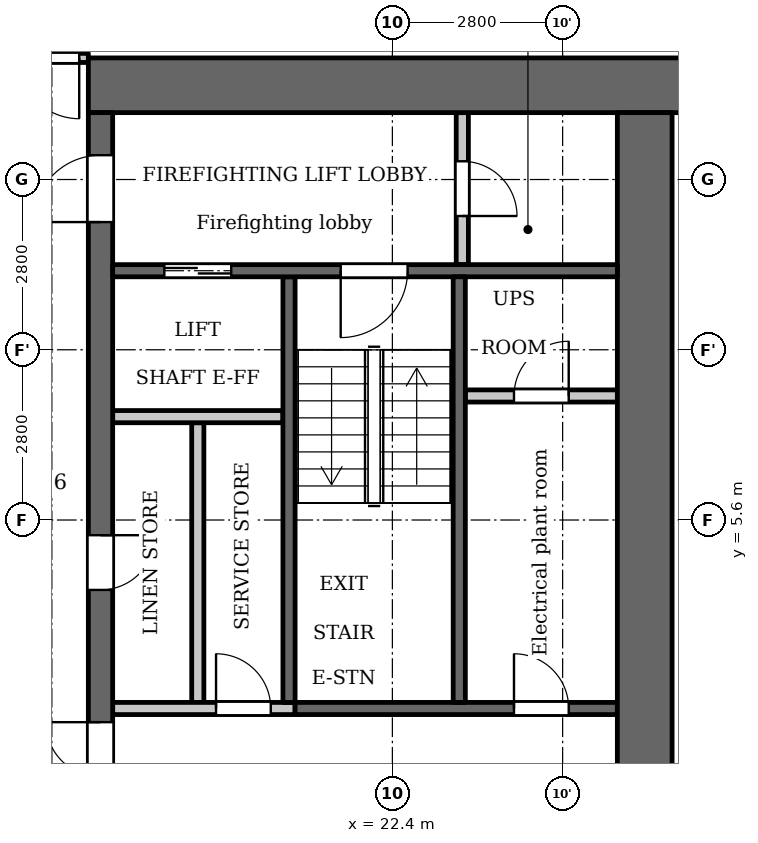
"""IFC4 building model, lengths in metres.
Left out: names, types, materials, properties, quantities, classifications, styles, units other than length and angle.
Written with IfcOpenShell. Run it as: python <this file> out.ifc"""

import sys

from ifc_helpers import new_model, si_unit, direction, frame, frame_2d, origin, place, context, subcontext, project, spatial, rectangle, extrude, element, fill, save


model = new_model("IFC4")
c1 = context("Model", 3, precision=1e-05, world=origin(), true_north=direction((0.0, 1.0)))
c2 = subcontext(c1, "Body", "Model", "MODEL_VIEW")
j1 = project(units=[si_unit("LENGTHUNIT", "METRE"), si_unit("PLANEANGLEUNIT", "RADIAN")], contexts=[c1])
p1 = place(None, origin())
s1 = spatial("IfcSite", under=j1, at=p1, CompositionType="ELEMENT")
p2 = place(p1, origin())
s2 = spatial("IfcBuilding", under=s1, at=p2, CompositionType="ELEMENT")
p3 = place(p2, frame((0.0, 0.0, 104.3)))
s3 = spatial("IfcBuildingStorey", under=s2, at=p3, CompositionType="ELEMENT", Elevation=104.3)
p4 = place(p3, frame((20.7, 2.6, 0.0), z_axis=(0.0, 0.0, 1.0), x_axis=(0.0, 1.0, 0.0)))
e1 = element("IfcWall", 1, at=p4, inside=s3, PredefinedType="SHEAR", context=c2, shape_type="SweptSolid", body=[
    extrude(rectangle(XDim=7.0, YDim=0.2, at=frame_2d((3.5, 0.0))), origin(), (0.0, 0.0, 1.0), 3.2),
])
p5 = place(p3, frame((20.8, 2.5, 0.0), z_axis=(0.0, 0.0, 1.0), x_axis=(1.0, 0.0, 0.0)))
e2 = element("IfcWall", 2, at=p5, inside=s3, PredefinedType="SHEAR", context=c2, shape_type="SweptSolid", body=[
    extrude(rectangle(XDim=5.3, YDim=0.2, at=frame_2d((2.65, 0.0))), origin(), (0.0, 0.0, 1.0), 3.2),
])
p6 = place(p5, frame((3.6, 0.0, 0.0)))
e3 = element("IfcOpeningElement", 3, at=p6, cuts=e2, PredefinedType="OPENING", context=c2, shape_type="SweptSolid", body=[
    extrude(rectangle(XDim=0.9, YDim=2.1, at=frame_2d((0.45, 1.05))), frame((0.0, 0.11, 0.0), z_axis=(0.0, -1.0, 0.0), x_axis=(1.0, 0.0, 0.0)), (0.0, 0.0, 1.0), 0.22),
])
p7 = place(p3, frame((17.4, 12.75, 0.0), z_axis=(0.0, 0.0, 1.0), x_axis=(1.0, 0.0, 0.0)))
e4 = element("IfcWall", 4, at=p7, inside=s3, PredefinedType="SHEAR", context=c2, shape_type="SweptSolid", body=[
    extrude(rectangle(XDim=10.4, YDim=0.9, at=frame_2d((5.2, 0.0))), origin(), (0.0, 0.0, 1.0), 3.2),
])
p8 = place(p3, frame((19.2, 2.6, 0.0), z_axis=(0.0, 0.0, 1.0), x_axis=(0.0, 1.0, 0.0)))
e5 = element("IfcWall", 5, at=p8, inside=s3, PredefinedType="PARTITIONING", context=c2, shape_type="SweptSolid", body=[
    extrude(rectangle(XDim=4.6, YDim=0.2, at=frame_2d((2.3, 0.0))), origin(), (0.0, 0.0, 1.0), 3.2),
])
p9 = place(p3, frame((17.6, -12.3, 0.0), z_axis=(0.0, 0.0, 1.0), x_axis=(0.0, 1.0, 0.0)))
e6 = element("IfcWall", 6, at=p9, inside=s3, PredefinedType="SHEAR", context=c2, shape_type="SweptSolid", body=[
    extrude(rectangle(XDim=24.6, YDim=0.4, at=frame_2d((12.3, 0.0))), origin(), (0.0, 0.0, 1.0), 3.2),
])
p10 = place(p9, frame((6.0, 0.0, 0.0)))
e7 = element("IfcOpeningElement", 7, at=p10, cuts=e6, PredefinedType="OPENING", context=c2, shape_type="SweptSolid", body=[
    extrude(rectangle(XDim=1.1, YDim=2.1, at=frame_2d((0.55, 1.05))), frame((0.0, 0.21, 0.0), z_axis=(0.0, -1.0, 0.0), x_axis=(1.0, 0.0, 0.0)), (0.0, 0.0, 1.0), 0.42),
])
p11 = place(p9, frame((8.4, 0.0, 0.0)))
e8 = element("IfcOpeningElement", 8, at=p11, cuts=e6, PredefinedType="OPENING", context=c2, shape_type="SweptSolid", body=[
    extrude(rectangle(XDim=1.1, YDim=2.1, at=frame_2d((0.55, 1.05))), frame((0.0, 0.21, 0.0), z_axis=(0.0, -1.0, 0.0), x_axis=(1.0, 0.0, 0.0)), (0.0, 0.0, 1.0), 0.42),
])
p12 = place(p9, frame((10.8, 0.0, 0.0)))
e9 = element("IfcOpeningElement", 9, at=p12, cuts=e6, PredefinedType="OPENING", context=c2, shape_type="SweptSolid", body=[
    extrude(rectangle(XDim=1.1, YDim=2.1, at=frame_2d((0.55, 1.05))), frame((0.0, 0.21, 0.0), z_axis=(0.0, -1.0, 0.0), x_axis=(1.0, 0.0, 0.0)), (0.0, 0.0, 1.0), 0.42),
])
p13 = place(p9, frame((16.75, 0.0, 0.0)))
e10 = element("IfcOpeningElement", 10, at=p13, cuts=e6, PredefinedType="OPENING", context=c2, shape_type="SweptSolid", body=[
    extrude(rectangle(XDim=0.9, YDim=2.1, at=frame_2d((0.45, 1.05))), frame((0.0, 0.21, 0.0), z_axis=(0.0, -1.0, 0.0), x_axis=(1.0, 0.0, 0.0)), (0.0, 0.0, 1.0), 0.42),
])
p14 = place(p9, frame((22.8, 0.0, 0.0)))
e11 = element("IfcOpeningElement", 11, at=p14, cuts=e6, PredefinedType="OPENING", context=c2, shape_type="SweptSolid", body=[
    extrude(rectangle(XDim=1.1, YDim=2.1, at=frame_2d((0.55, 1.05))), frame((0.0, 0.21, 0.0), z_axis=(0.0, -1.0, 0.0), x_axis=(1.0, 0.0, 0.0)), (0.0, 0.0, 1.0), 0.42),
])
p15 = place(p9, frame((0.7, 0.0, 0.0)))
e12 = element("IfcOpeningElement", 12, at=p15, cuts=e6, PredefinedType="OPENING", context=c2, shape_type="SweptSolid", body=[
    extrude(rectangle(XDim=1.1, YDim=2.1, at=frame_2d((0.55, 1.05))), frame((0.0, 0.21, 0.0), z_axis=(0.0, -1.0, 0.0), x_axis=(1.0, 0.0, 0.0)), (0.0, 0.0, 1.0), 0.42),
])
p16 = place(p9, frame((12.775, 0.0, 0.0)))
e13 = element("IfcOpeningElement", 13, at=p16, cuts=e6, PredefinedType="OPENING", context=c2, shape_type="SweptSolid", body=[
    extrude(rectangle(XDim=1.8, YDim=2.1, at=frame_2d((0.9, 1.05))), frame((0.0, 0.21, 0.0), z_axis=(0.0, -1.0, 0.0), x_axis=(1.0, 0.0, 0.0)), (0.0, 0.0, 1.0), 0.42),
])
p17 = place(p3, frame((26.55, -12.3, 0.0), z_axis=(0.0, 0.0, 1.0), x_axis=(0.0, 1.0, 0.0)))
e14 = element("IfcWall", 14, at=p17, inside=s3, PredefinedType="SHEAR", context=c2, shape_type="SweptSolid", body=[
    extrude(rectangle(XDim=24.6, YDim=0.9, at=frame_2d((12.3, 0.0))), origin(), (0.0, 0.0, 1.0), 3.2),
])
p18 = place(p3, frame((23.55, 9.8, 0.0), z_axis=(0.0, 0.0, 1.0), x_axis=(0.0, 1.0, 0.0)))
e15 = element("IfcWall", 15, at=p18, inside=s3, PredefinedType="PARTITIONING", context=c2, shape_type="SweptSolid", body=[
    extrude(rectangle(XDim=2.5, YDim=0.2, at=frame_2d((1.25, 0.0))), origin(), (0.0, 0.0, 1.0), 3.2),
])
p19 = place(p18, frame((0.8, 0.0, 0.0)))
e16 = element("IfcOpeningElement", 16, at=p19, cuts=e15, PredefinedType="OPENING", context=c2, shape_type="SweptSolid", body=[
    extrude(rectangle(XDim=0.9, YDim=2.1, at=frame_2d((0.45, 1.05))), frame((0.0, 0.11, 0.0), z_axis=(0.0, -1.0, 0.0), x_axis=(1.0, 0.0, 0.0)), (0.0, 0.0, 1.0), 0.22),
])
p20 = place(p3, frame((23.6, 7.64, 0.0), z_axis=(0.0, 0.0, 1.0), x_axis=(1.0, 0.0, 0.0)))
e17 = element("IfcWall", 17, at=p20, inside=s3, PredefinedType="PARTITIONING", context=c2, shape_type="SweptSolid", body=[
    extrude(rectangle(XDim=2.5, YDim=0.2, at=frame_2d((1.25, 0.0))), origin(), (0.0, 0.0, 1.0), 3.2),
])
p21 = place(p20, frame((0.8, 0.0, 0.0)))
e18 = element("IfcOpeningElement", 18, at=p21, cuts=e17, PredefinedType="OPENING", context=c2, shape_type="SweptSolid", body=[
    extrude(rectangle(XDim=0.9, YDim=2.1, at=frame_2d((0.45, 1.05))), frame((0.0, 0.11, 0.0), z_axis=(0.0, -1.0, 0.0), x_axis=(1.0, 0.0, 0.0)), (0.0, 0.0, 1.0), 0.22),
])
p22 = place(p3, frame((17.8, 2.5, 0.0), z_axis=(0.0, 0.0, 1.0), x_axis=(1.0, 0.0, 0.0)))
e19 = element("IfcWall", 19, at=p22, inside=s3, PredefinedType="PARTITIONING", context=c2, shape_type="SweptSolid", body=[
    extrude(rectangle(XDim=3.0, YDim=0.2, at=frame_2d((1.5, 0.0))), origin(), (0.0, 0.0, 1.0), 3.2),
])
p23 = place(p22, frame((1.7, 0.0, 0.0)))
e20 = element("IfcOpeningElement", 20, at=p23, cuts=e19, PredefinedType="OPENING", context=c2, shape_type="SweptSolid", body=[
    extrude(rectangle(XDim=0.9, YDim=2.1, at=frame_2d((0.45, 1.05))), frame((0.0, 0.11, 0.0), z_axis=(0.0, -1.0, 0.0), x_axis=(1.0, 0.0, 0.0)), (0.0, 0.0, 1.0), 0.22),
])
p24 = place(p3, frame((17.8, 7.3, 0.0), z_axis=(0.0, 0.0, 1.0), x_axis=(1.0, 0.0, 0.0)))
e21 = element("IfcWall", 21, at=p24, inside=s3, PredefinedType="PARTITIONING", context=c2, shape_type="SweptSolid", body=[
    extrude(rectangle(XDim=2.8, YDim=0.2, at=frame_2d((1.4, 0.0))), origin(), (0.0, 0.0, 1.0), 3.2),
])
p25 = place(p3, frame((17.8, 9.7, 0.0), z_axis=(0.0, 0.0, 1.0), x_axis=(1.0, 0.0, 0.0)))
e22 = element("IfcWall", 22, at=p25, inside=s3, PredefinedType="SHEAR", context=c2, shape_type="SweptSolid", body=[
    extrude(rectangle(XDim=8.3, YDim=0.2, at=frame_2d((4.15, 0.0))), origin(), (0.0, 0.0, 1.0), 3.2),
])
p26 = place(p25, frame((0.85, 0.0, 0.0)))
e23 = element("IfcOpeningElement", 23, at=p26, cuts=e22, PredefinedType="OPENING", context=c2, shape_type="SweptSolid", body=[
    extrude(rectangle(XDim=1.1, YDim=2.1, at=frame_2d((0.55, 1.05))), frame((0.0, 0.11, 0.0), z_axis=(0.0, -1.0, 0.0), x_axis=(1.0, 0.0, 0.0)), (0.0, 0.0, 1.0), 0.22),
])
p27 = place(p25, frame((3.75, 0.0, 0.0)))
e24 = element("IfcOpeningElement", 24, at=p27, cuts=e22, PredefinedType="OPENING", context=c2, shape_type="SweptSolid", body=[
    extrude(rectangle(XDim=1.1, YDim=2.1, at=frame_2d((0.55, 1.05))), frame((0.0, 0.11, 0.0), z_axis=(0.0, -1.0, 0.0), x_axis=(1.0, 0.0, 0.0)), (0.0, 0.0, 1.0), 0.22),
])
p28 = place(p3, frame((23.5, 2.6, 0.0), z_axis=(0.0, 0.0, 1.0), x_axis=(0.0, 1.0, 0.0)))
e25 = element("IfcWall", 25, at=p28, inside=s3, PredefinedType="SHEAR", context=c2, shape_type="SweptSolid", body=[
    extrude(rectangle(XDim=7.0, YDim=0.2, at=frame_2d((3.5, 0.0))), origin(), (0.0, 0.0, 1.0), 3.2),
])
p29 = place(p3, frame((-17.4, 13.2, 0.0), z_axis=(0.0, 0.0, 1.0), x_axis=(1.0, 0.0, 0.0)))
e26 = element("IfcWall", 26, at=p29, inside=s3, PredefinedType="PARTITIONING", context=c2, shape_type="SweptSolid", body=[
    extrude(rectangle(XDim=34.8, YDim=0.15, at=frame_2d((17.4, 0.0))), origin(), (0.0, 0.0, 1.0), 3.2),
])
p30 = place(p29, frame((0.25, 0.0, 0.0)))
e27 = element("IfcOpeningElement", 27, at=p30, cuts=e26, PredefinedType="OPENING", context=c2, shape_type="SweptSolid", body=[
    extrude(rectangle(XDim=1.0, YDim=2.1, at=frame_2d((0.5, 1.05))), frame((0.0, 0.085, 0.0), z_axis=(0.0, -1.0, 0.0), x_axis=(1.0, 0.0, 0.0)), (0.0, 0.0, 1.0), 0.17),
])
p31 = place(p29, frame((33.65, 0.0, 0.0)))
e28 = element("IfcOpeningElement", 28, at=p31, cuts=e26, PredefinedType="OPENING", context=c2, shape_type="SweptSolid", body=[
    extrude(rectangle(XDim=1.0, YDim=2.1, at=frame_2d((0.5, 1.05))), frame((0.0, 0.085, 0.0), z_axis=(0.0, -1.0, 0.0), x_axis=(1.0, 0.0, 0.0)), (0.0, 0.0, 1.0), 0.17),
])
p32 = place(p29, frame((4.55, 0.0, 0.0)))
e29 = element("IfcOpeningElement", 29, at=p32, cuts=e26, PredefinedType="OPENING", context=c2, shape_type="SweptSolid", body=[
    extrude(rectangle(XDim=1.0, YDim=2.1, at=frame_2d((0.5, 1.05))), frame((0.0, 0.085, 0.0), z_axis=(0.0, -1.0, 0.0), x_axis=(1.0, 0.0, 0.0)), (0.0, 0.0, 1.0), 0.17),
])
p33 = place(p29, frame((6.85, 0.0, 0.0)))
e30 = element("IfcOpeningElement", 30, at=p33, cuts=e26, PredefinedType="OPENING", context=c2, shape_type="SweptSolid", body=[
    extrude(rectangle(XDim=1.0, YDim=2.1, at=frame_2d((0.5, 1.05))), frame((0.0, 0.085, 0.0), z_axis=(0.0, -1.0, 0.0), x_axis=(1.0, 0.0, 0.0)), (0.0, 0.0, 1.0), 0.17),
])
p34 = place(p29, frame((12.5, 0.0, 0.0)))
e31 = element("IfcOpeningElement", 31, at=p34, cuts=e26, PredefinedType="OPENING", context=c2, shape_type="SweptSolid", body=[
    extrude(rectangle(XDim=1.0, YDim=2.1, at=frame_2d((0.5, 1.05))), frame((0.0, 0.085, 0.0), z_axis=(0.0, -1.0, 0.0), x_axis=(1.0, 0.0, 0.0)), (0.0, 0.0, 1.0), 0.17),
])
p35 = place(p29, frame((25.7, 0.0, 0.0)))
e32 = element("IfcOpeningElement", 32, at=p35, cuts=e26, PredefinedType="OPENING", context=c2, shape_type="SweptSolid", body=[
    extrude(rectangle(XDim=1.0, YDim=2.1, at=frame_2d((0.5, 1.05))), frame((0.0, 0.085, 0.0), z_axis=(0.0, -1.0, 0.0), x_axis=(1.0, 0.0, 0.0)), (0.0, 0.0, 1.0), 0.17),
])
p36 = place(p29, frame((29.75, 0.0, 0.0)))
e33 = element("IfcOpeningElement", 33, at=p36, cuts=e26, PredefinedType="OPENING", context=c2, shape_type="SweptSolid", body=[
    extrude(rectangle(XDim=1.0, YDim=2.1, at=frame_2d((0.5, 1.05))), frame((0.0, 0.085, 0.0), z_axis=(0.0, -1.0, 0.0), x_axis=(1.0, 0.0, 0.0)), (0.0, 0.0, 1.0), 0.17),
])
p37 = place(p13, origin())
e34 = element("IfcDoor", 34, at=p37, inside=s3, OperationType="SINGLE_SWING_RIGHT", PredefinedType="DOOR", context=c2, shape_type="SweptSolid", body=[
    extrude(rectangle(XDim=0.9, YDim=2.1, at=frame_2d((0.45, 1.05))), frame((0.0, 0.025, 0.0), z_axis=(0.0, -1.0, 0.0), x_axis=(1.0, 0.0, 0.0)), (0.0, 0.0, 1.0), 0.05),
])
fill(e10, e34)
p38 = place(p23, origin())
e35 = element("IfcDoor", 35, at=p38, inside=s3, OperationType="SINGLE_SWING_RIGHT", PredefinedType="DOOR", context=c2, shape_type="SweptSolid", body=[
    extrude(rectangle(XDim=0.9, YDim=2.1, at=frame_2d((0.45, 1.05))), frame((0.0, 0.025, 0.0), z_axis=(0.0, -1.0, 0.0), x_axis=(1.0, 0.0, 0.0)), (0.0, 0.0, 1.0), 0.05),
])
fill(e20, e35)
p39 = place(p26, origin())
e36 = element("IfcDoor", 36, at=p39, inside=s3, OperationType="DOUBLE_DOOR_SLIDING", PredefinedType="DOOR", context=c2, shape_type="SweptSolid", body=[
    extrude(rectangle(XDim=1.1, YDim=2.1, at=frame_2d((0.55, 1.05))), frame((0.0, 0.025, 0.0), z_axis=(0.0, -1.0, 0.0), x_axis=(1.0, 0.0, 0.0)), (0.0, 0.0, 1.0), 0.05),
])
fill(e23, e36)
p40 = place(p14, origin())
e37 = element("IfcDoor", 37, at=p40, inside=s3, OperationType="SINGLE_SWING_RIGHT", PredefinedType="DOOR", context=c2, shape_type="SweptSolid", body=[
    extrude(rectangle(XDim=1.1, YDim=2.1, at=frame_2d((0.55, 1.05))), frame((0.0, 0.025, 0.0), z_axis=(0.0, -1.0, 0.0), x_axis=(1.0, 0.0, 0.0)), (0.0, 0.0, 1.0), 0.05),
])
fill(e11, e37)
p41 = place(p19, origin())
e38 = element("IfcDoor", 38, at=p41, inside=s3, OperationType="SINGLE_SWING_LEFT", PredefinedType="DOOR", context=c2, shape_type="SweptSolid", body=[
    extrude(rectangle(XDim=0.9, YDim=2.1, at=frame_2d((0.45, 1.05))), frame((0.0, 0.025, 0.0), z_axis=(0.0, -1.0, 0.0), x_axis=(1.0, 0.0, 0.0)), (0.0, 0.0, 1.0), 0.05),
])
fill(e16, e38)
p42 = place(p27, origin())
e39 = element("IfcDoor", 39, at=p42, inside=s3, OperationType="SINGLE_SWING_LEFT", PredefinedType="DOOR", context=c2, shape_type="SweptSolid", body=[
    extrude(rectangle(XDim=1.1, YDim=2.1, at=frame_2d((0.55, 1.05))), frame((0.0, 0.025, 0.0), z_axis=(0.0, -1.0, 0.0), x_axis=(1.0, 0.0, 0.0)), (0.0, 0.0, 1.0), 0.05),
])
fill(e24, e39)
p43 = place(p16, origin())
e40 = element("IfcDoor", 40, at=p43, inside=s3, OperationType="DOUBLE_DOOR_SINGLE_SWING", PredefinedType="DOOR", context=c2, shape_type="SweptSolid", body=[
    extrude(rectangle(XDim=1.8, YDim=2.1, at=frame_2d((0.9, 1.05))), frame((0.0, 0.025, 0.0), z_axis=(0.0, -1.0, 0.0), x_axis=(1.0, 0.0, 0.0)), (0.0, 0.0, 1.0), 0.05),
])
fill(e13, e40)
p44 = place(p21, origin())
e41 = element("IfcDoor", 41, at=p44, inside=s3, OperationType="SINGLE_SWING_LEFT", PredefinedType="DOOR", context=c2, shape_type="SweptSolid", body=[
    extrude(rectangle(XDim=0.9, YDim=2.1, at=frame_2d((0.45, 1.05))), frame((0.0, 0.025, 0.0), z_axis=(0.0, -1.0, 0.0), x_axis=(1.0, 0.0, 0.0)), (0.0, 0.0, 1.0), 0.05),
])
fill(e18, e41)
p45 = place(p6, origin())
e42 = element("IfcDoor", 42, at=p45, inside=s3, OperationType="SINGLE_SWING_RIGHT", PredefinedType="DOOR", context=c2, shape_type="SweptSolid", body=[
    extrude(rectangle(XDim=0.9, YDim=2.1, at=frame_2d((0.45, 1.05))), frame((0.0, 0.025, 0.0), z_axis=(0.0, -1.0, 0.0), x_axis=(1.0, 0.0, 0.0)), (0.0, 0.0, 1.0), 0.05),
])
fill(e3, e42)
p46 = place(p31, origin())
e43 = element("IfcDoor", 43, at=p46, inside=s3, OperationType="SINGLE_SWING_RIGHT", PredefinedType="DOOR", context=c2, shape_type="SweptSolid", body=[
    extrude(rectangle(XDim=1.0, YDim=2.1, at=frame_2d((0.5, 1.05))), frame((0.0, 0.025, 0.0), z_axis=(0.0, -1.0, 0.0), x_axis=(1.0, 0.0, 0.0)), (0.0, 0.0, 1.0), 0.05),
])
fill(e28, e43)
save(model, sys.argv[1])
